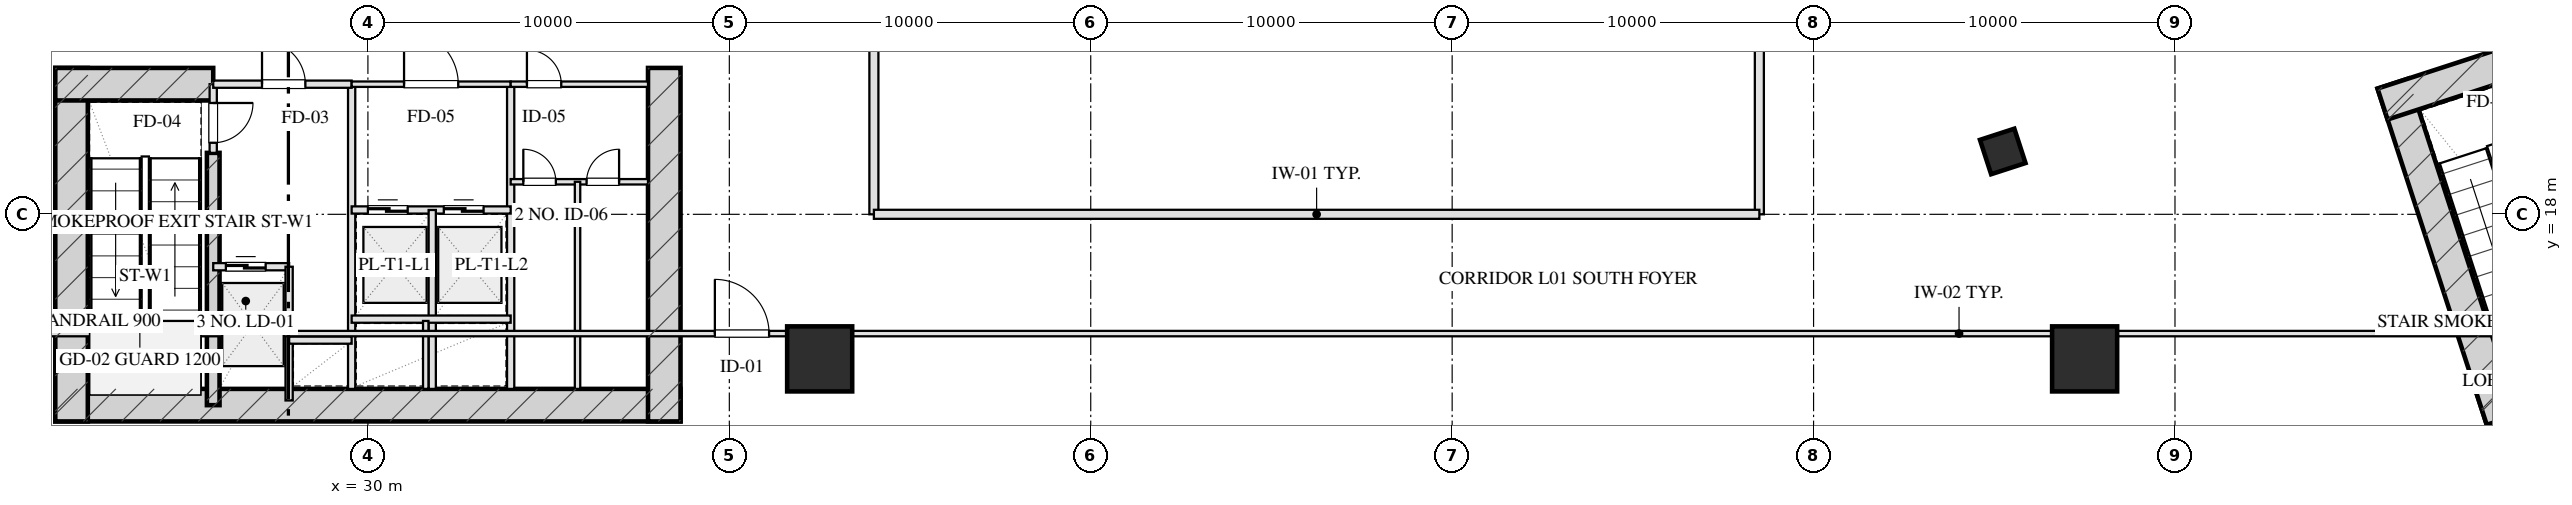
"""IFC4 building model, lengths in metres.
Left out: names, types, materials, properties, quantities, classifications, styles, units other than length and angle.
Written with IfcOpenShell. Run it as: python <this file> out.ifc"""

import sys

from ifc_helpers import new_model, si_unit, direction, frame, frame_2d, origin, origin_2d, place, context, subcontext, project, spatial, rectangle, hollow_rectangle, extrude, element, fill, save


model = new_model("IFC4")
c1 = context("Model", 3, precision=1e-05, world=origin(), true_north=direction((0.0, 1.0)))
c2 = subcontext(c1, "Body", "Model", "MODEL_VIEW")
j1 = project(units=[si_unit("LENGTHUNIT", "METRE"), si_unit("PLANEANGLEUNIT", "RADIAN")], contexts=[c1])
p1 = place(None, origin())
s1 = spatial("IfcSite", under=j1, at=p1, CompositionType="ELEMENT")
p2 = place(p1, origin())
s2 = spatial("IfcBuilding", under=s1, at=p2, CompositionType="ELEMENT")
p3 = place(p2, frame((0.0, 0.0, 6.0)))
s3 = spatial("IfcBuildingStorey", under=s2, at=p3, CompositionType="ELEMENT", Elevation=6.0)
p4 = place(p3, frame((21.35, 12.72, 0.0), z_axis=(0.0, 0.0, 1.0), x_axis=(1.0, 0.0, 0.0)))
e1 = element("IfcWall", 1, at=p4, inside=s3, PredefinedType="SHEAR", context=c2, shape_type="SweptSolid", body=[
    extrude(rectangle(XDim=17.3, YDim=0.9, at=frame_2d((8.65, 0.0))), origin(), (0.0, 0.0, 1.0), 5.5),
])
for number, where, z_axis, x_axis in (
    (2, (21.8, 22.05, 0.0), (0.0, 0.0, 1.0), (0.0, -1.0, 0.0)),
    (3, (38.2, 22.05, 0.0), (0.0, 0.0, 1.0), (0.0, -1.0, 0.0)),
):
    element("IfcWall", number, at=place(p3, frame(where, z_axis=z_axis, x_axis=x_axis)), inside=s3, PredefinedType="SHEAR", context=c2, shape_type="SweptSolid", body=[
        extrude(rectangle(XDim=9.78, YDim=0.9, at=frame_2d((4.89, 0.0))), origin(), (0.0, 0.0, 1.0), 5.5),
    ])
p5 = place(p3, frame((25.72, 19.7, 0.0), z_axis=(0.0, 0.0, 1.0), x_axis=(0.0, -1.0, 0.0)))
e4 = element("IfcWall", 4, at=p5, inside=s3, PredefinedType="SHEAR", context=c2, shape_type="SweptSolid", body=[
    extrude(rectangle(XDim=6.98, YDim=0.35, at=frame_2d((3.49, 0.0))), origin(), (0.0, 0.0, 1.0), 5.5),
])
p6 = place(p3, frame((21.35, 21.6, 0.0), z_axis=(0.0, 0.0, 1.0), x_axis=(1.0, 0.0, 0.0)))
e5 = element("IfcWall", 5, at=p6, inside=s3, PredefinedType="SHEAR", context=c2, shape_type="SweptSolid", body=[
    extrude(rectangle(XDim=4.37, YDim=0.9, at=frame_2d((2.185, 0.0))), origin(), (0.0, 0.0, 1.0), 5.5),
])
p7 = place(p3, frame((88.487, 12.605, 0.0), z_axis=(0.0, 0.0, 1.0), x_axis=(0.951055016115, 0.309021611416, 0.0)))
e6 = element("IfcWall", 6, at=p7, inside=s3, PredefinedType="SHEAR", context=c2, shape_type="SweptSolid", body=[
    extrude(rectangle(XDim=16.7, YDim=0.9, at=frame_2d((8.35, 0.0))), origin(), (0.0, 0.0, 1.0), 5.5),
])
p8 = place(p3, frame((86.032, 21.618, 0.0), z_axis=(0.0, 0.0, 1.0), x_axis=(0.30901438634, -0.951057363693, 0.0)))
e7 = element("IfcWall", 7, at=p8, inside=s3, PredefinedType="SHEAR", context=c2, shape_type="SweptSolid", body=[
    extrude(rectangle(XDim=9.78, YDim=0.9, at=frame_2d((4.89, 0.0))), origin(), (0.0, 0.0, 1.0), 5.5),
])
p9 = place(p3, frame((85.743, 21.051, 0.0), z_axis=(0.0, 0.0, 1.0), x_axis=(0.951063623806, 0.308995118848, 0.0)))
e8 = element("IfcWall", 8, at=p9, inside=s3, PredefinedType="SHEAR", context=c2, shape_type="SweptSolid", body=[
    extrude(rectangle(XDim=4.37, YDim=0.9, at=frame_2d((2.185, 0.0))), origin(), (0.0, 0.0, 1.0), 5.5),
])
for number, where, z_axis, x_axis in (
    (9, (42.5, 14.0, 0.0), (0.0, 0.0, 1.0), (1.0, 0.0, 0.0)),
    (10, (77.5, 14.0, 0.0), (0.0, 0.0, 1.0), (1.0, 0.0, 0.0)),
):
    element("IfcColumn", number, at=place(p3, frame(where, z_axis=z_axis, x_axis=x_axis)), inside=s3, PredefinedType="COLUMN", context=c2, shape_type="SweptSolid", body=[
        extrude(hollow_rectangle(XDim=1.8, YDim=1.8, WallThickness=0.06, at=origin_2d()), origin(), (0.0, 0.0, 1.0), 5.501),
    ])
p10 = place(p3, frame((75.234, 19.739, 0.0), z_axis=(0.0, 0.0, 1.0), x_axis=(0.951056516295, 0.309016994375, 0.0)))
e11 = element("IfcColumn", 11, at=p10, inside=s3, PredefinedType="COLUMN", context=c2, shape_type="SweptSolid", body=[
    extrude(hollow_rectangle(XDim=1.0, YDim=1.0, WallThickness=0.036, at=origin_2d()), origin(), (0.0, 0.0, 1.0), 5.501),
])
p11 = place(p3, frame((25.72, 21.6, 0.0), z_axis=(0.0, 0.0, 1.0), x_axis=(0.0, -1.0, 0.0)))
e12 = element("IfcWall", 12, at=p11, inside=s3, PredefinedType="PARTITIONING", context=c2, shape_type="SweptSolid", body=[
    extrude(rectangle(XDim=1.9, YDim=0.2, at=frame_2d((0.95, 0.0))), origin(), (0.0, 0.0, 1.0), 5.185),
])
p12 = place(p11, frame((0.52, 0.0, 0.0)))
e13 = element("IfcOpeningElement", 13, at=p12, cuts=e12, PredefinedType="OPENING", context=c2, shape_type="SweptSolid", body=[
    extrude(rectangle(XDim=1.1, YDim=2.05, at=frame_2d((0.55, 1.025))), frame((0.0, 0.11, 0.0), z_axis=(0.0, -1.0, 0.0), x_axis=(1.0, 0.0, 0.0)), (0.0, 0.0, 1.0), 0.22),
])
p13 = place(p3, frame((29.55, 21.6, 0.0), z_axis=(0.0, 0.0, 1.0), x_axis=(0.0, -1.0, 0.0)))
e14 = element("IfcWall", 14, at=p13, inside=s3, PredefinedType="PARTITIONING", context=c2, shape_type="SweptSolid", body=[
    extrude(rectangle(XDim=8.43, YDim=0.2, at=frame_2d((4.215, 0.0))), origin(), (0.0, 0.0, 1.0), 5.185),
])
p14 = place(p3, frame((25.72, 21.6, 0.0), z_axis=(0.0, 0.0, 1.0), x_axis=(1.0, 0.0, 0.0)))
e15 = element("IfcWall", 15, at=p14, inside=s3, PredefinedType="PARTITIONING", context=c2, shape_type="SweptSolid", body=[
    extrude(rectangle(XDim=3.83, YDim=0.2, at=frame_2d((1.915, 0.0))), origin(), (0.0, 0.0, 1.0), 5.185),
])
p15 = place(p14, frame((1.35, 0.0, 0.0)))
e16 = element("IfcOpeningElement", 16, at=p15, cuts=e15, PredefinedType="OPENING", context=c2, shape_type="SweptSolid", body=[
    extrude(rectangle(XDim=1.2, YDim=2.05, at=frame_2d((0.6, 1.025))), frame((0.0, 0.11, 0.0), z_axis=(0.0, -1.0, 0.0), x_axis=(1.0, 0.0, 0.0)), (0.0, 0.0, 1.0), 0.22),
])
p16 = place(p3, frame((25.72, 16.55, 0.0), z_axis=(0.0, 0.0, 1.0), x_axis=(1.0, 0.0, 0.0)))
e17 = element("IfcWall", 17, at=p16, inside=s3, PredefinedType="PARTITIONING", context=c2, shape_type="SweptSolid", body=[
    extrude(rectangle(XDim=2.1, YDim=0.2, at=frame_2d((1.05, 0.0))), origin(), (0.0, 0.0, 1.0), 5.185),
])
p17 = place(p16, frame((0.35, 0.0, 0.0)))
e18 = element("IfcOpeningElement", 18, at=p17, cuts=e17, PredefinedType="OPENING", context=c2, shape_type="SweptSolid", body=[
    extrude(rectangle(XDim=1.1, YDim=2.05, at=frame_2d((0.55, 1.025))), frame((0.0, 0.11, 0.0), z_axis=(0.0, -1.0, 0.0), x_axis=(1.0, 0.0, 0.0)), (0.0, 0.0, 1.0), 0.22),
])
p18 = place(p3, frame((27.82, 16.55, 0.0), z_axis=(0.0, 0.0, 1.0), x_axis=(0.0, -1.0, 0.0)))
e19 = element("IfcWall", 19, at=p18, inside=s3, PredefinedType="PARTITIONING", context=c2, shape_type="SweptSolid", body=[
    extrude(rectangle(XDim=3.7, YDim=0.2, at=frame_2d((1.85, 0.0))), origin(), (0.0, 0.0, 1.0), 5.185),
])
p19 = place(p3, frame((27.82, 14.52, 0.0), z_axis=(0.0, 0.0, 1.0), x_axis=(1.0, 0.0, 0.0)))
e20 = element("IfcWall", 20, at=p19, inside=s3, PredefinedType="PARTITIONING", context=c2, shape_type="SweptSolid", body=[
    extrude(rectangle(XDim=1.73, YDim=0.2, at=frame_2d((0.865, 0.0))), origin(), (0.0, 0.0, 1.0), 5.185),
])
p20 = place(p3, frame((33.95, 21.6, 0.0), z_axis=(0.0, 0.0, 1.0), x_axis=(0.0, -1.0, 0.0)))
e21 = element("IfcWall", 21, at=p20, inside=s3, PredefinedType="PARTITIONING", context=c2, shape_type="SweptSolid", body=[
    extrude(rectangle(XDim=8.43, YDim=0.2, at=frame_2d((4.215, 0.0))), origin(), (0.0, 0.0, 1.0), 5.185),
])
p21 = place(p3, frame((29.55, 21.6, 0.0), z_axis=(0.0, 0.0, 1.0), x_axis=(1.0, 0.0, 0.0)))
e22 = element("IfcWall", 22, at=p21, inside=s3, PredefinedType="PARTITIONING", context=c2, shape_type="SweptSolid", body=[
    extrude(rectangle(XDim=4.4, YDim=0.15, at=frame_2d((2.2, 0.0))), origin(), (0.0, 0.0, 1.0), 5.185),
])
p22 = place(p21, frame((1.45, 0.0, 0.0)))
e23 = element("IfcOpeningElement", 23, at=p22, cuts=e22, PredefinedType="OPENING", context=c2, shape_type="SweptSolid", body=[
    extrude(rectangle(XDim=1.5, YDim=2.05, at=frame_2d((0.75, 1.025))), frame((0.0, 0.085, 0.0), z_axis=(0.0, -1.0, 0.0), x_axis=(1.0, 0.0, 0.0)), (0.0, 0.0, 1.0), 0.17),
])
p23 = place(p3, frame((29.55, 18.12, 0.0), z_axis=(0.0, 0.0, 1.0), x_axis=(1.0, 0.0, 0.0)))
e24 = element("IfcWall", 24, at=p23, inside=s3, PredefinedType="PARTITIONING", context=c2, shape_type="SweptSolid", body=[
    extrude(rectangle(XDim=4.4, YDim=0.2, at=frame_2d((2.2, 0.0))), origin(), (0.0, 0.0, 1.0), 5.185),
])
p24 = place(p23, frame((0.45, 0.0, 0.0)))
e25 = element("IfcOpeningElement", 25, at=p24, cuts=e24, PredefinedType="OPENING", context=c2, shape_type="SweptSolid", body=[
    extrude(rectangle(XDim=1.1, YDim=2.05, at=frame_2d((0.55, 1.025))), frame((0.0, 0.11, 0.0), z_axis=(0.0, -1.0, 0.0), x_axis=(1.0, 0.0, 0.0)), (0.0, 0.0, 1.0), 0.22),
])
p25 = place(p23, frame((2.55, 0.0, 0.0)))
e26 = element("IfcOpeningElement", 26, at=p25, cuts=e24, PredefinedType="OPENING", context=c2, shape_type="SweptSolid", body=[
    extrude(rectangle(XDim=1.1, YDim=2.05, at=frame_2d((0.55, 1.025))), frame((0.0, 0.11, 0.0), z_axis=(0.0, -1.0, 0.0), x_axis=(1.0, 0.0, 0.0)), (0.0, 0.0, 1.0), 0.22),
])
p26 = place(p3, frame((31.78, 18.12, 0.0), z_axis=(0.0, 0.0, 1.0), x_axis=(0.0, -1.0, 0.0)))
e27 = element("IfcWall", 27, at=p26, inside=s3, PredefinedType="PARTITIONING", context=c2, shape_type="SweptSolid", body=[
    extrude(rectangle(XDim=4.95, YDim=0.2, at=frame_2d((2.475, 0.0))), origin(), (0.0, 0.0, 1.0), 5.185),
])
p27 = place(p3, frame((29.55, 15.1, 0.0), z_axis=(0.0, 0.0, 1.0), x_axis=(1.0, 0.0, 0.0)))
e28 = element("IfcWall", 28, at=p27, inside=s3, PredefinedType="PARTITIONING", context=c2, shape_type="SweptSolid", body=[
    extrude(rectangle(XDim=4.4, YDim=0.2, at=frame_2d((2.2, 0.0))), origin(), (0.0, 0.0, 1.0), 5.185),
])
p28 = place(p3, frame((31.6, 15.05, 0.0), z_axis=(0.0, 0.0, 1.0), x_axis=(0.0, -1.0, 0.0)))
e29 = element("IfcWall", 29, at=p28, inside=s3, PredefinedType="PARTITIONING", context=c2, shape_type="SweptSolid", body=[
    extrude(rectangle(XDim=1.88, YDim=0.15, at=frame_2d((0.94, 0.0))), origin(), (0.0, 0.0, 1.0), 5.185),
])
p29 = place(p3, frame((33.95, 21.6, 0.0), z_axis=(0.0, 0.0, 1.0), x_axis=(1.0, 0.0, 0.0)))
e30 = element("IfcWall", 30, at=p29, inside=s3, PredefinedType="PARTITIONING", context=c2, shape_type="SweptSolid", body=[
    extrude(rectangle(XDim=3.8, YDim=0.15, at=frame_2d((1.9, 0.0))), origin(), (0.0, 0.0, 1.0), 5.185),
])
p30 = place(p29, frame((0.45, 0.0, 0.0)))
e31 = element("IfcOpeningElement", 31, at=p30, cuts=e30, PredefinedType="OPENING", context=c2, shape_type="SweptSolid", body=[
    extrude(rectangle(XDim=0.95, YDim=2.05, at=frame_2d((0.475, 1.025))), frame((0.0, 0.085, 0.0), z_axis=(0.0, -1.0, 0.0), x_axis=(1.0, 0.0, 0.0)), (0.0, 0.0, 1.0), 0.17),
])
p31 = place(p3, frame((33.95, 18.9, 0.0), z_axis=(0.0, 0.0, 1.0), x_axis=(1.0, 0.0, 0.0)))
e32 = element("IfcWall", 32, at=p31, inside=s3, PredefinedType="PARTITIONING", context=c2, shape_type="SweptSolid", body=[
    extrude(rectangle(XDim=3.8, YDim=0.15, at=frame_2d((1.9, 0.0))), origin(), (0.0, 0.0, 1.0), 5.185),
])
p32 = place(p31, frame((0.35, 0.0, 0.0)))
e33 = element("IfcOpeningElement", 33, at=p32, cuts=e32, PredefinedType="OPENING", context=c2, shape_type="SweptSolid", body=[
    extrude(rectangle(XDim=0.9, YDim=2.05, at=frame_2d((0.45, 1.025))), frame((0.0, 0.085, 0.0), z_axis=(0.0, -1.0, 0.0), x_axis=(1.0, 0.0, 0.0)), (0.0, 0.0, 1.0), 0.17),
])
p33 = place(p31, frame((2.1, 0.0, 0.0)))
e34 = element("IfcOpeningElement", 34, at=p33, cuts=e32, PredefinedType="OPENING", context=c2, shape_type="SweptSolid", body=[
    extrude(rectangle(XDim=0.9, YDim=2.05, at=frame_2d((0.45, 1.025))), frame((0.0, 0.085, 0.0), z_axis=(0.0, -1.0, 0.0), x_axis=(1.0, 0.0, 0.0)), (0.0, 0.0, 1.0), 0.17),
])
p34 = place(p3, frame((35.8, 18.9, 0.0), z_axis=(0.0, 0.0, 1.0), x_axis=(0.0, -1.0, 0.0)))
e35 = element("IfcWall", 35, at=p34, inside=s3, PredefinedType="PARTITIONING", context=c2, shape_type="SweptSolid", body=[
    extrude(rectangle(XDim=5.73, YDim=0.15, at=frame_2d((2.865, 0.0))), origin(), (0.0, 0.0, 1.0), 5.185),
])
p35 = place(p3, frame((44.0, 18.0, 0.0), z_axis=(0.0, 0.0, 1.0), x_axis=(0.0, 1.0, 0.0)))
e36 = element("IfcWall", 36, at=p35, inside=s3, PredefinedType="PARTITIONING", context=c2, shape_type="SweptSolid", body=[
    extrude(rectangle(XDim=32.0, YDim=0.25, at=frame_2d((16.0, 0.0))), origin(), (0.0, 0.0, 1.0), 5.185),
])
p36 = place(p35, frame((9.4, 0.0, 0.0)))
e37 = element("IfcOpeningElement", 37, at=p36, cuts=e36, PredefinedType="OPENING", context=c2, shape_type="SweptSolid", body=[
    extrude(rectangle(XDim=1.8, YDim=2.05, at=frame_2d((0.9, 1.025))), frame((0.0, 0.135, 0.0), z_axis=(0.0, -1.0, 0.0), x_axis=(1.0, 0.0, 0.0)), (0.0, 0.0, 1.0), 0.27),
])
p37 = place(p35, frame((20.6, 0.0, 0.0)))
e38 = element("IfcOpeningElement", 38, at=p37, cuts=e36, PredefinedType="OPENING", context=c2, shape_type="SweptSolid", body=[
    extrude(rectangle(XDim=1.8, YDim=2.05, at=frame_2d((0.9, 1.025))), frame((0.0, 0.135, 0.0), z_axis=(0.0, -1.0, 0.0), x_axis=(1.0, 0.0, 0.0)), (0.0, 0.0, 1.0), 0.27),
])
p38 = place(p3, frame((68.5, 18.0, 0.0), z_axis=(0.0, 0.0, 1.0), x_axis=(0.0, 1.0, 0.0)))
e39 = element("IfcWall", 39, at=p38, inside=s3, PredefinedType="PARTITIONING", context=c2, shape_type="SweptSolid", body=[
    extrude(rectangle(XDim=32.0, YDim=0.25, at=frame_2d((16.0, 0.0))), origin(), (0.0, 0.0, 1.0), 5.185),
])
p39 = place(p38, frame((7.5, 0.0, 0.0)))
e40 = element("IfcOpeningElement", 40, at=p39, cuts=e39, PredefinedType="OPENING", context=c2, shape_type="SweptSolid", body=[
    extrude(rectangle(XDim=1.8, YDim=2.05, at=frame_2d((0.9, 1.025))), frame((0.0, 0.135, 0.0), z_axis=(0.0, -1.0, 0.0), x_axis=(1.0, 0.0, 0.0)), (0.0, 0.0, 1.0), 0.27),
])
p40 = place(p38, frame((22.5, 0.0, 0.0)))
e41 = element("IfcOpeningElement", 41, at=p40, cuts=e39, PredefinedType="OPENING", context=c2, shape_type="SweptSolid", body=[
    extrude(rectangle(XDim=1.8, YDim=2.05, at=frame_2d((0.9, 1.025))), frame((0.0, 0.135, 0.0), z_axis=(0.0, -1.0, 0.0), x_axis=(1.0, 0.0, 0.0)), (0.0, 0.0, 1.0), 0.27),
])
p41 = place(p3, frame((44.0, 18.0, 0.0), z_axis=(0.0, 0.0, 1.0), x_axis=(1.0, 0.0, 0.0)))
e42 = element("IfcWall", 42, at=p41, inside=s3, PredefinedType="PARTITIONING", context=c2, shape_type="SweptSolid", body=[
    extrude(rectangle(XDim=24.5, YDim=0.25, at=frame_2d((12.25, 0.0))), origin(), (0.0, 0.0, 1.0), 5.185),
])
p42 = place(p3, frame((18.0, 14.7, 0.0), z_axis=(0.0, 0.0, 1.0), x_axis=(1.0, 0.0, 0.0)))
e43 = element("IfcWall", 43, at=p42, inside=s3, PredefinedType="PARTITIONING", context=c2, shape_type="SweptSolid", body=[
    extrude(rectangle(XDim=88.2, YDim=0.15, at=frame_2d((44.1, 0.0))), origin(), (0.0, 0.0, 1.0), 2.325),
])
p43 = place(p42, frame((21.6, 0.0, 0.0)))
e44 = element("IfcOpeningElement", 44, at=p43, cuts=e43, PredefinedType="OPENING", context=c2, shape_type="SweptSolid", body=[
    extrude(rectangle(XDim=1.5, YDim=2.05, at=frame_2d((0.75, 1.025))), frame((0.0, 0.085, 0.0), z_axis=(0.0, -1.0, 0.0), x_axis=(1.0, 0.0, 0.0)), (0.0, 0.0, 1.0), 0.17),
])
p44 = place(p12, origin())
e45 = element("IfcDoor", 45, at=p44, inside=s3, OperationType="SINGLE_SWING_LEFT", PredefinedType="DOOR", context=c2, shape_type="SweptSolid", body=[
    extrude(rectangle(XDim=1.1, YDim=2.05, at=frame_2d((0.55, 1.025))), frame((0.0, 0.025, 0.0), z_axis=(0.0, -1.0, 0.0), x_axis=(1.0, 0.0, 0.0)), (0.0, 0.0, 1.0), 0.05),
])
fill(e13, e45)
p45 = place(p15, origin())
e46 = element("IfcDoor", 46, at=p45, inside=s3, OperationType="SINGLE_SWING_LEFT", PredefinedType="DOOR", context=c2, shape_type="SweptSolid", body=[
    extrude(rectangle(XDim=1.2, YDim=2.05, at=frame_2d((0.6, 1.025))), frame((0.0, 0.025, 0.0), z_axis=(0.0, -1.0, 0.0), x_axis=(1.0, 0.0, 0.0)), (0.0, 0.0, 1.0), 0.05),
])
fill(e16, e46)
p46 = place(p17, origin())
e47 = element("IfcDoor", 47, at=p46, inside=s3, OperationType="DOUBLE_DOOR_SLIDING", PredefinedType="DOOR", context=c2, shape_type="SweptSolid", body=[
    extrude(rectangle(XDim=1.1, YDim=2.05, at=frame_2d((0.55, 1.025))), frame((0.0, 0.025, 0.0), z_axis=(0.0, -1.0, 0.0), x_axis=(1.0, 0.0, 0.0)), (0.0, 0.0, 1.0), 0.05),
])
fill(e18, e47)
p47 = place(p22, origin())
e48 = element("IfcDoor", 48, at=p47, inside=s3, OperationType="SINGLE_SWING_LEFT", PredefinedType="DOOR", context=c2, shape_type="SweptSolid", body=[
    extrude(rectangle(XDim=1.5, YDim=2.05, at=frame_2d((0.75, 1.025))), frame((0.0, 0.025, 0.0), z_axis=(0.0, -1.0, 0.0), x_axis=(1.0, 0.0, 0.0)), (0.0, 0.0, 1.0), 0.05),
])
fill(e23, e48)
p48 = place(p24, origin())
e49 = element("IfcDoor", 49, at=p48, inside=s3, OperationType="DOUBLE_DOOR_SLIDING", PredefinedType="DOOR", context=c2, shape_type="SweptSolid", body=[
    extrude(rectangle(XDim=1.1, YDim=2.05, at=frame_2d((0.55, 1.025))), frame((0.0, 0.025, 0.0), z_axis=(0.0, -1.0, 0.0), x_axis=(1.0, 0.0, 0.0)), (0.0, 0.0, 1.0), 0.05),
])
fill(e25, e49)
p49 = place(p25, origin())
e50 = element("IfcDoor", 50, at=p49, inside=s3, OperationType="DOUBLE_DOOR_SLIDING", PredefinedType="DOOR", context=c2, shape_type="SweptSolid", body=[
    extrude(rectangle(XDim=1.1, YDim=2.05, at=frame_2d((0.55, 1.025))), frame((0.0, 0.025, 0.0), z_axis=(0.0, -1.0, 0.0), x_axis=(1.0, 0.0, 0.0)), (0.0, 0.0, 1.0), 0.05),
])
fill(e26, e50)
p50 = place(p30, origin())
e51 = element("IfcDoor", 51, at=p50, inside=s3, OperationType="SINGLE_SWING_LEFT", PredefinedType="DOOR", context=c2, shape_type="SweptSolid", body=[
    extrude(rectangle(XDim=0.95, YDim=2.05, at=frame_2d((0.475, 1.025))), frame((0.0, 0.025, 0.0), z_axis=(0.0, -1.0, 0.0), x_axis=(1.0, 0.0, 0.0)), (0.0, 0.0, 1.0), 0.05),
])
fill(e31, e51)
p51 = place(p32, origin())
e52 = element("IfcDoor", 52, at=p51, inside=s3, OperationType="SINGLE_SWING_LEFT", PredefinedType="DOOR", context=c2, shape_type="SweptSolid", body=[
    extrude(rectangle(XDim=0.9, YDim=2.05, at=frame_2d((0.45, 1.025))), frame((0.0, 0.025, 0.0), z_axis=(0.0, -1.0, 0.0), x_axis=(1.0, 0.0, 0.0)), (0.0, 0.0, 1.0), 0.05),
])
fill(e33, e52)
p52 = place(p33, origin())
e53 = element("IfcDoor", 53, at=p52, inside=s3, OperationType="SINGLE_SWING_RIGHT", PredefinedType="DOOR", context=c2, shape_type="SweptSolid", body=[
    extrude(rectangle(XDim=0.9, YDim=2.05, at=frame_2d((0.45, 1.025))), frame((0.0, 0.025, 0.0), z_axis=(0.0, -1.0, 0.0), x_axis=(1.0, 0.0, 0.0)), (0.0, 0.0, 1.0), 0.05),
])
fill(e34, e53)
p53 = place(p43, origin())
e54 = element("IfcDoor", 54, at=p53, inside=s3, OperationType="SINGLE_SWING_LEFT", PredefinedType="DOOR", context=c2, shape_type="SweptSolid", body=[
    extrude(rectangle(XDim=1.5, YDim=2.05, at=frame_2d((0.75, 1.025))), frame((0.0, 0.025, 0.0), z_axis=(0.0, -1.0, 0.0), x_axis=(1.0, 0.0, 0.0)), (0.0, 0.0, 1.0), 0.05),
])
fill(e44, e54)
save(model, sys.argv[1])
